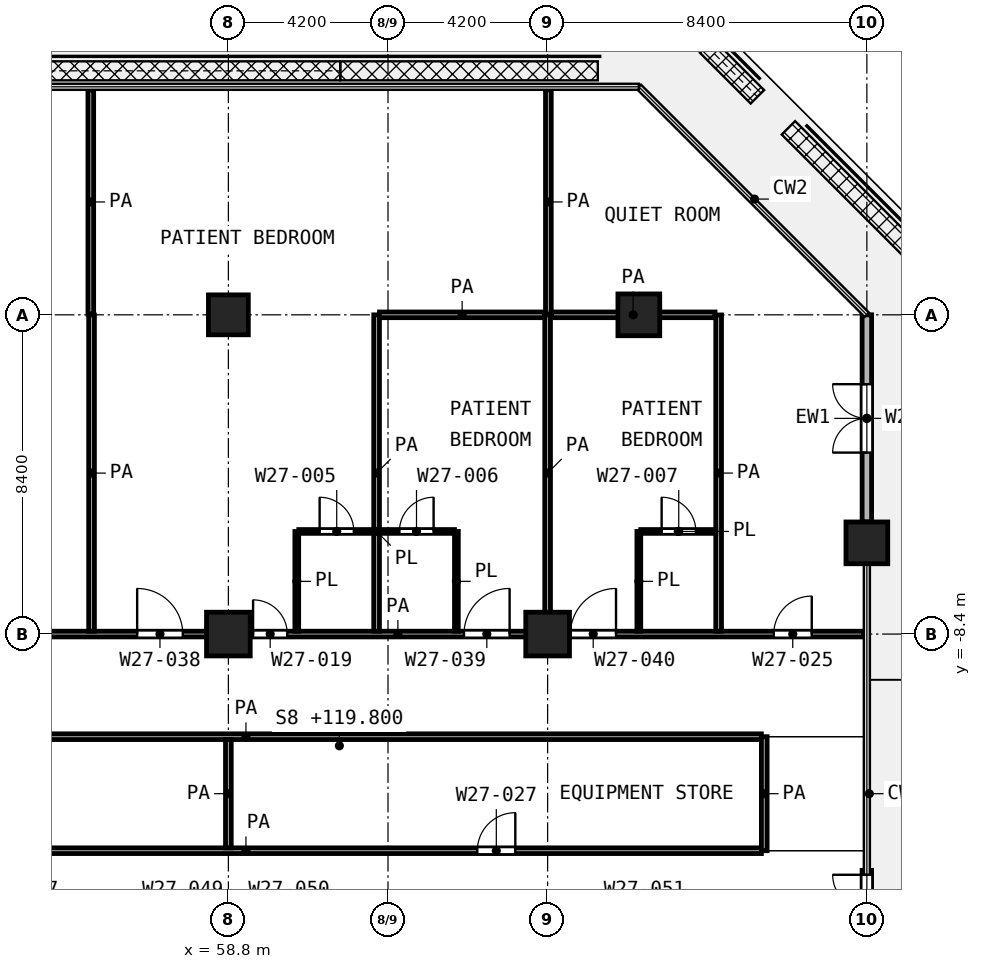
"""IFC4 building model, lengths in metres.
Left out: names, types, materials, properties, quantities, classifications, styles, units other than length and angle.
Written with IfcOpenShell. Run it as: python <this file> out.ifc"""

import sys

from ifc_helpers import new_model, si_unit, direction, frame, frame_2d, origin, origin_2d, place, context, subcontext, project, spatial, rectangle, extrude, element, fill, save


model = new_model("IFC4")
c1 = context("Model", 3, precision=1e-05, world=origin(), true_north=direction((0.0, 1.0)))
c2 = subcontext(c1, "Body", "Model", "MODEL_VIEW")
j1 = project(units=[si_unit("LENGTHUNIT", "METRE"), si_unit("PLANEANGLEUNIT", "RADIAN")], contexts=[c1])
p1 = place(None, origin())
s1 = spatial("IfcSite", under=j1, at=p1, CompositionType="ELEMENT")
p2 = place(p1, origin())
s2 = spatial("IfcBuilding", under=s1, at=p2, CompositionType="ELEMENT")
p3 = place(p2, frame((0.0, 0.0, 119.8)))
s3 = spatial("IfcBuildingStorey", under=s2, at=p3, CompositionType="ELEMENT", Elevation=119.8)
p4 = place(p3, frame((58.8, 0.0, 0.0), z_axis=(0.0, 0.0, 1.0), x_axis=(1.0, 0.0, 0.0)))
e1 = element("IfcColumn", 1, at=p4, inside=s3, PredefinedType="COLUMN", context=c2, shape_type="SweptSolid", body=[
    extrude(rectangle(XDim=1.05, YDim=1.05, at=origin_2d()), origin(), (0.0, 0.0, 1.0), 4.2),
])
for number, where, z_axis, x_axis in (
    (2, (69.6, 0.0, 0.0), (0.0, 0.0, 1.0), (1.0, 0.0, 0.0)),
    (3, (75.6, -6.0, 0.0), (0.0, 0.0, 1.0), (1.0, 0.0, 0.0)),
):
    element("IfcColumn", number, at=place(p3, frame(where, z_axis=z_axis, x_axis=x_axis)), inside=s3, PredefinedType="COLUMN", context=c2, shape_type="SweptSolid", body=[
        extrude(rectangle(XDim=1.1, YDim=1.1, at=origin_2d()), origin(), (0.0, 0.0, 1.0), 4.2),
    ])
for number, where, z_axis, x_axis in (
    (4, (58.8, -8.4, 0.0), (0.0, 0.0, 1.0), (1.0, 0.0, 0.0)),
    (5, (67.2, -8.4, 0.0), (0.0, 0.0, 1.0), (1.0, 0.0, 0.0)),
):
    element("IfcColumn", number, at=place(p3, frame(where, z_axis=z_axis, x_axis=x_axis)), inside=s3, PredefinedType="COLUMN", context=c2, shape_type="SweptSolid", body=[
        extrude(rectangle(XDim=1.15, YDim=1.15, at=origin_2d()), origin(), (0.0, 0.0, 1.0), 4.2),
    ])
p5 = place(p3, frame((75.6, -18.65, 0.0), z_axis=(0.0, 0.0, 1.0), x_axis=(0.0, 1.0, 0.0)))
e6 = element("IfcWall", 6, at=p5, inside=s3, PredefinedType="SOLIDWALL", context=c2, shape_type="SweptSolid", body=[
    extrude(rectangle(XDim=4.033, YDim=0.25, at=frame_2d((2.017, 0.0))), origin(), (0.0, 0.0, 1.0), 3.48),
])
p6 = place(p5, frame((2.117, 0.0, 0.0)))
e7 = element("IfcOpeningElement", 7, at=p6, cuts=e6, PredefinedType="OPENING", context=c2, shape_type="SweptSolid", body=[
    extrude(rectangle(XDim=1.8, YDim=2.1, at=frame_2d((0.9, 1.05))), frame((0.0, 0.135, 0.0), z_axis=(0.0, -1.0, 0.0), x_axis=(1.0, 0.0, 0.0)), (0.0, 0.0, 1.0), 0.27),
])
p7 = place(p3, frame((75.6, -5.45, 0.0), z_axis=(0.0, 0.0, 1.0), x_axis=(0.0, 1.0, 0.0)))
e8 = element("IfcWall", 8, at=p7, inside=s3, PredefinedType="SOLIDWALL", context=c2, shape_type="SweptSolid", body=[
    extrude(rectangle(XDim=5.45, YDim=0.25, at=frame_2d((2.725, 0.0))), origin(), (0.0, 0.0, 1.0), 3.48),
])
p8 = place(p7, frame((1.825, 0.0, 0.0)))
e9 = element("IfcOpeningElement", 9, at=p8, cuts=e8, PredefinedType="OPENING", context=c2, shape_type="SweptSolid", body=[
    extrude(rectangle(XDim=1.8, YDim=2.1, at=frame_2d((0.9, 1.05))), frame((0.0, 0.135, 0.0), z_axis=(0.0, -1.0, 0.0), x_axis=(1.0, 0.0, 0.0)), (0.0, 0.0, 1.0), 0.27),
])
p9 = place(p3, frame((60.652, -5.7, 0.0), z_axis=(0.0, 0.0, 1.0), x_axis=(1.0, 0.0, 0.0)))
e10 = element("IfcWall", 10, at=p9, inside=s3, PredefinedType="PARTITIONING", context=c2, shape_type="SweptSolid", body=[
    extrude(rectangle(XDim=4.098, YDim=0.1, at=frame_2d((2.049, 0.0))), origin(), (0.0, 0.0, 1.0), 3.6),
])
p10 = place(p9, frame((0.549, 0.0, 0.0)))
e11 = element("IfcOpeningElement", 11, at=p10, cuts=e10, PredefinedType="OPENING", context=c2, shape_type="SweptSolid", body=[
    extrude(rectangle(XDim=0.9, YDim=2.1, at=frame_2d((0.45, 1.05))), frame((0.0, 0.06, 0.0), z_axis=(0.0, -1.0, 0.0), x_axis=(1.0, 0.0, 0.0)), (0.0, 0.0, 1.0), 0.12),
])
p11 = place(p9, frame((2.648, 0.0, 0.0)))
e12 = element("IfcOpeningElement", 12, at=p11, cuts=e10, PredefinedType="OPENING", context=c2, shape_type="SweptSolid", body=[
    extrude(rectangle(XDim=0.9, YDim=2.1, at=frame_2d((0.45, 1.05))), frame((0.0, 0.06, 0.0), z_axis=(0.0, -1.0, 0.0), x_axis=(1.0, 0.0, 0.0)), (0.0, 0.0, 1.0), 0.12),
])
p12 = place(p3, frame((69.65, -5.7, 0.0), z_axis=(0.0, 0.0, 1.0), x_axis=(1.0, 0.0, 0.0)))
e13 = element("IfcWall", 13, at=p12, inside=s3, PredefinedType="PARTITIONING", context=c2, shape_type="SweptSolid", body=[
    extrude(rectangle(XDim=1.975, YDim=0.1, at=frame_2d((0.988, 0.0))), origin(), (0.0, 0.0, 1.0), 3.6),
])
p13 = place(p12, frame((0.55, 0.0, 0.0)))
e14 = element("IfcOpeningElement", 14, at=p13, cuts=e13, PredefinedType="OPENING", context=c2, shape_type="SweptSolid", body=[
    extrude(rectangle(XDim=0.9, YDim=2.1, at=frame_2d((0.45, 1.05))), frame((0.0, 0.06, 0.0), z_axis=(0.0, -1.0, 0.0), x_axis=(1.0, 0.0, 0.0)), (0.0, 0.0, 1.0), 0.12),
])
p14 = place(p3, frame((60.6, -8.325, 0.0), z_axis=(0.0, 0.0, 1.0), x_axis=(0.0, 1.0, 0.0)))
e15 = element("IfcWall", 15, at=p14, inside=s3, PredefinedType="PARTITIONING", context=c2, shape_type="SweptSolid", body=[
    extrude(rectangle(XDim=2.624, YDim=0.1, at=frame_2d((1.312, 0.0))), origin(), (0.0, 0.0, 1.0), 3.6),
])
for number, where, z_axis, x_axis in (
    (16, (64.8, -8.325, 0.0), (0.0, 0.0, 1.0), (0.0, 1.0, 0.0)),
    (17, (69.6, -8.325, 0.0), (0.0, 0.0, 1.0), (0.0, 1.0, 0.0)),
):
    element("IfcWall", number, at=place(p3, frame(where, z_axis=z_axis, x_axis=x_axis)), inside=s3, PredefinedType="PARTITIONING", context=c2, shape_type="SweptSolid", body=[
        extrude(rectangle(XDim=2.625, YDim=0.1, at=frame_2d((1.312, 0.0))), origin(), (0.0, 0.0, 1.0), 3.6),
    ])
p15 = place(p3, frame((45.7, -14.1, 0.0), z_axis=(0.0, 0.0, 1.0), x_axis=(1.0, 0.0, 0.0)))
e18 = element("IfcWall", 18, at=p15, inside=s3, PredefinedType="PARTITIONING", context=c2, shape_type="SweptSolid", body=[
    extrude(rectangle(XDim=27.125, YDim=0.15, at=frame_2d((13.562, 0.0))), origin(), (0.0, 0.0, 1.0), 3.6),
])
p16 = place(p15, frame((5.9, 0.0, 0.0)))
e19 = element("IfcOpeningElement", 19, at=p16, cuts=e18, PredefinedType="OPENING", context=c2, shape_type="SweptSolid", body=[
    extrude(rectangle(XDim=1.2, YDim=2.1, at=frame_2d((0.6, 1.05))), frame((0.0, 0.085, 0.0), z_axis=(0.0, -1.0, 0.0), x_axis=(1.0, 0.0, 0.0)), (0.0, 0.0, 1.0), 0.17),
])
p17 = place(p15, frame((19.65, 0.0, 0.0)))
e20 = element("IfcOpeningElement", 20, at=p17, cuts=e18, PredefinedType="OPENING", context=c2, shape_type="SweptSolid", body=[
    extrude(rectangle(XDim=1.0, YDim=2.1, at=frame_2d((0.5, 1.05))), frame((0.0, 0.085, 0.0), z_axis=(0.0, -1.0, 0.0), x_axis=(1.0, 0.0, 0.0)), (0.0, 0.0, 1.0), 0.17),
])
p18 = place(p3, frame((45.7, -11.1, 0.0), z_axis=(0.0, 0.0, 1.0), x_axis=(1.0, 0.0, 0.0)))
e21 = element("IfcWall", 21, at=p18, inside=s3, PredefinedType="PARTITIONING", context=c2, shape_type="SweptSolid", body=[
    extrude(rectangle(XDim=27.125, YDim=0.15, at=frame_2d((13.562, 0.0))), origin(), (0.0, 0.0, 1.0), 3.6),
])
p19 = place(p3, frame((51.0, -8.4, 0.0), z_axis=(0.0, 0.0, 1.0), x_axis=(1.0, 0.0, 0.0)))
e22 = element("IfcWall", 22, at=p19, inside=s3, PredefinedType="PARTITIONING", context=c2, shape_type="SweptSolid", body=[
    extrude(rectangle(XDim=24.52, YDim=0.15, at=frame_2d((12.26, 0.0))), origin(), (0.0, 0.0, 1.0), 3.6),
])
p20 = place(p19, frame((5.4, 0.0, 0.0)))
e23 = element("IfcOpeningElement", 23, at=p20, cuts=e22, PredefinedType="OPENING", context=c2, shape_type="SweptSolid", body=[
    extrude(rectangle(XDim=1.2, YDim=2.1, at=frame_2d((0.6, 1.05))), frame((0.0, 0.085, 0.0), z_axis=(0.0, -1.0, 0.0), x_axis=(1.0, 0.0, 0.0)), (0.0, 0.0, 1.0), 0.17),
])
p21 = place(p19, frame((8.45, 0.0, 0.0)))
e24 = element("IfcOpeningElement", 24, at=p21, cuts=e22, PredefinedType="OPENING", context=c2, shape_type="SweptSolid", body=[
    extrude(rectangle(XDim=0.9, YDim=2.1, at=frame_2d((0.45, 1.05))), frame((0.0, 0.085, 0.0), z_axis=(0.0, -1.0, 0.0), x_axis=(1.0, 0.0, 0.0)), (0.0, 0.0, 1.0), 0.17),
])
p22 = place(p19, frame((14.0, 0.0, 0.0)))
e25 = element("IfcOpeningElement", 25, at=p22, cuts=e22, PredefinedType="OPENING", context=c2, shape_type="SweptSolid", body=[
    extrude(rectangle(XDim=1.2, YDim=2.1, at=frame_2d((0.6, 1.05))), frame((0.0, 0.085, 0.0), z_axis=(0.0, -1.0, 0.0), x_axis=(1.0, 0.0, 0.0)), (0.0, 0.0, 1.0), 0.17),
])
p23 = place(p19, frame((16.8, 0.0, 0.0)))
e26 = element("IfcOpeningElement", 26, at=p23, cuts=e22, PredefinedType="OPENING", context=c2, shape_type="SweptSolid", body=[
    extrude(rectangle(XDim=1.2, YDim=2.1, at=frame_2d((0.6, 1.05))), frame((0.0, 0.085, 0.0), z_axis=(0.0, -1.0, 0.0), x_axis=(1.0, 0.0, 0.0)), (0.0, 0.0, 1.0), 0.17),
])
p24 = place(p19, frame((22.15, 0.0, 0.0)))
e27 = element("IfcOpeningElement", 27, at=p24, cuts=e22, PredefinedType="OPENING", context=c2, shape_type="SweptSolid", body=[
    extrude(rectangle(XDim=1.0, YDim=2.1, at=frame_2d((0.5, 1.05))), frame((0.0, 0.085, 0.0), z_axis=(0.0, -1.0, 0.0), x_axis=(1.0, 0.0, 0.0)), (0.0, 0.0, 1.0), 0.17),
])
p25 = place(p3, frame((62.777, 0.0, 0.0), z_axis=(0.0, 0.0, 1.0), x_axis=(1.0, 0.0, 0.0)))
e28 = element("IfcWall", 28, at=p25, inside=s3, PredefinedType="PARTITIONING", context=c2, shape_type="SweptSolid", body=[
    extrude(rectangle(XDim=4.348, YDim=0.15, at=frame_2d((2.174, 0.0))), origin(), (0.0, 0.0, 1.0), 3.6),
])
p26 = place(p3, frame((67.295, 0.0, 0.0), z_axis=(0.0, 0.0, 1.0), x_axis=(1.0, 0.0, 0.0)))
e29 = element("IfcWall", 29, at=p26, inside=s3, PredefinedType="PARTITIONING", context=c2, shape_type="SweptSolid", body=[
    extrude(rectangle(XDim=4.31, YDim=0.15, at=frame_2d((2.155, 0.0))), origin(), (0.0, 0.0, 1.0), 3.6),
])
p27 = place(p3, frame((55.18, 0.02, 0.0), z_axis=(0.0, 0.0, 1.0), x_axis=(0.0, 1.0, 0.0)))
e30 = element("IfcWall", 30, at=p27, inside=s3, PredefinedType="PARTITIONING", context=c2, shape_type="SweptSolid", body=[
    extrude(rectangle(XDim=5.9, YDim=0.15, at=frame_2d((2.95, 0.0))), origin(), (0.0, 0.0, 1.0), 3.6),
])
p28 = place(p3, frame((55.2, -8.325, 0.0), z_axis=(0.0, 0.0, 1.0), x_axis=(0.0, 1.0, 0.0)))
e31 = element("IfcWall", 31, at=p28, inside=s3, PredefinedType="PARTITIONING", context=c2, shape_type="SweptSolid", body=[
    extrude(rectangle(XDim=8.321, YDim=0.15, at=frame_2d((4.161, 0.0))), origin(), (0.0, 0.0, 1.0), 3.6),
])
p29 = place(p3, frame((58.8, -14.025, 0.0), z_axis=(0.0, 0.0, 1.0), x_axis=(0.0, 1.0, 0.0)))
e32 = element("IfcWall", 32, at=p29, inside=s3, PredefinedType="PARTITIONING", context=c2, shape_type="SweptSolid", body=[
    extrude(rectangle(XDim=2.85, YDim=0.15, at=frame_2d((1.425, 0.0))), origin(), (0.0, 0.0, 1.0), 3.6),
])
p30 = place(p3, frame((62.7, -8.325, 0.0), z_axis=(0.0, 0.0, 1.0), x_axis=(0.0, 1.0, 0.0)))
e33 = element("IfcWall", 33, at=p30, inside=s3, PredefinedType="PARTITIONING", context=c2, shape_type="SweptSolid", body=[
    extrude(rectangle(XDim=8.324, YDim=0.15, at=frame_2d((4.162, 0.0))), origin(), (0.0, 0.0, 1.0), 3.6),
])
p31 = place(p3, frame((67.2, -8.325, 0.0), z_axis=(0.0, 0.0, 1.0), x_axis=(0.0, 1.0, 0.0)))
e34 = element("IfcWall", 34, at=p31, inside=s3, PredefinedType="PARTITIONING", context=c2, shape_type="SweptSolid", body=[
    extrude(rectangle(XDim=8.325, YDim=0.15, at=frame_2d((4.163, 0.0))), origin(), (0.0, 0.0, 1.0), 3.6),
])
p32 = place(p3, frame((67.22, 0.02, 0.0), z_axis=(0.0, 0.0, 1.0), x_axis=(0.0, 1.0, 0.0)))
e35 = element("IfcWall", 35, at=p32, inside=s3, PredefinedType="PARTITIONING", context=c2, shape_type="SweptSolid", body=[
    extrude(rectangle(XDim=5.9, YDim=0.15, at=frame_2d((2.95, 0.0))), origin(), (0.0, 0.0, 1.0), 3.6),
])
p33 = place(p3, frame((71.7, -8.325, 0.0), z_axis=(0.0, 0.0, 1.0), x_axis=(0.0, 1.0, 0.0)))
e36 = element("IfcWall", 36, at=p33, inside=s3, PredefinedType="PARTITIONING", context=c2, shape_type="SweptSolid", body=[
    extrude(rectangle(XDim=8.322, YDim=0.15, at=frame_2d((4.161, 0.0))), origin(), (0.0, 0.0, 1.0), 3.6),
])
p34 = place(p3, frame((72.9, -14.1, 0.0), z_axis=(0.0, 0.0, 1.0), x_axis=(0.0, 1.0, 0.0)))
e37 = element("IfcWall", 37, at=p34, inside=s3, PredefinedType="PARTITIONING", context=c2, shape_type="SweptSolid", body=[
    extrude(rectangle(XDim=3.0, YDim=0.15, at=frame_2d((1.5, 0.0))), origin(), (0.0, 0.0, 1.0), 3.6),
])
p35 = place(p6, origin())
e38 = element("IfcDoor", 38, at=p35, inside=s3, OperationType="DOUBLE_DOOR_SINGLE_SWING", PredefinedType="DOOR", context=c2, shape_type="SweptSolid", body=[
    extrude(rectangle(XDim=1.8, YDim=2.1, at=frame_2d((0.9, 1.05))), frame((0.0, 0.025, 0.0), z_axis=(0.0, -1.0, 0.0), x_axis=(1.0, 0.0, 0.0)), (0.0, 0.0, 1.0), 0.05),
])
fill(e7, e38)
p36 = place(p8, origin())
e39 = element("IfcDoor", 39, at=p36, inside=s3, OperationType="DOUBLE_DOOR_SINGLE_SWING", PredefinedType="DOOR", context=c2, shape_type="SweptSolid", body=[
    extrude(rectangle(XDim=1.8, YDim=2.1, at=frame_2d((0.9, 1.05))), frame((0.0, 0.025, 0.0), z_axis=(0.0, -1.0, 0.0), x_axis=(1.0, 0.0, 0.0)), (0.0, 0.0, 1.0), 0.05),
])
fill(e9, e39)
p37 = place(p20, origin())
e40 = element("IfcDoor", 40, at=p37, inside=s3, OperationType="SINGLE_SWING_LEFT", PredefinedType="DOOR", context=c2, shape_type="SweptSolid", body=[
    extrude(rectangle(XDim=1.2, YDim=2.1, at=frame_2d((0.6, 1.05))), frame((0.0, 0.025, 0.0), z_axis=(0.0, -1.0, 0.0), x_axis=(1.0, 0.0, 0.0)), (0.0, 0.0, 1.0), 0.05),
])
fill(e23, e40)
p38 = place(p21, origin())
e41 = element("IfcDoor", 41, at=p38, inside=s3, OperationType="SINGLE_SWING_LEFT", PredefinedType="DOOR", context=c2, shape_type="SweptSolid", body=[
    extrude(rectangle(XDim=0.9, YDim=2.1, at=frame_2d((0.45, 1.05))), frame((0.0, 0.025, 0.0), z_axis=(0.0, -1.0, 0.0), x_axis=(1.0, 0.0, 0.0)), (0.0, 0.0, 1.0), 0.05),
])
fill(e24, e41)
p39 = place(p10, origin())
e42 = element("IfcDoor", 42, at=p39, inside=s3, OperationType="SINGLE_SWING_LEFT", PredefinedType="DOOR", context=c2, shape_type="SweptSolid", body=[
    extrude(rectangle(XDim=0.9, YDim=2.1, at=frame_2d((0.45, 1.05))), frame((0.0, 0.025, 0.0), z_axis=(0.0, -1.0, 0.0), x_axis=(1.0, 0.0, 0.0)), (0.0, 0.0, 1.0), 0.05),
])
fill(e11, e42)
p40 = place(p22, origin())
e43 = element("IfcDoor", 43, at=p40, inside=s3, OperationType="SINGLE_SWING_RIGHT", PredefinedType="DOOR", context=c2, shape_type="SweptSolid", body=[
    extrude(rectangle(XDim=1.2, YDim=2.1, at=frame_2d((0.6, 1.05))), frame((0.0, 0.025, 0.0), z_axis=(0.0, -1.0, 0.0), x_axis=(1.0, 0.0, 0.0)), (0.0, 0.0, 1.0), 0.05),
])
fill(e25, e43)
p41 = place(p11, origin())
e44 = element("IfcDoor", 44, at=p41, inside=s3, OperationType="SINGLE_SWING_RIGHT", PredefinedType="DOOR", context=c2, shape_type="SweptSolid", body=[
    extrude(rectangle(XDim=0.9, YDim=2.1, at=frame_2d((0.45, 1.05))), frame((0.0, 0.025, 0.0), z_axis=(0.0, -1.0, 0.0), x_axis=(1.0, 0.0, 0.0)), (0.0, 0.0, 1.0), 0.05),
])
fill(e12, e44)
p42 = place(p23, origin())
e45 = element("IfcDoor", 45, at=p42, inside=s3, OperationType="SINGLE_SWING_RIGHT", PredefinedType="DOOR", context=c2, shape_type="SweptSolid", body=[
    extrude(rectangle(XDim=1.2, YDim=2.1, at=frame_2d((0.6, 1.05))), frame((0.0, 0.025, 0.0), z_axis=(0.0, -1.0, 0.0), x_axis=(1.0, 0.0, 0.0)), (0.0, 0.0, 1.0), 0.05),
])
fill(e26, e45)
p43 = place(p13, origin())
e46 = element("IfcDoor", 46, at=p43, inside=s3, OperationType="SINGLE_SWING_LEFT", PredefinedType="DOOR", context=c2, shape_type="SweptSolid", body=[
    extrude(rectangle(XDim=0.9, YDim=2.1, at=frame_2d((0.45, 1.05))), frame((0.0, 0.025, 0.0), z_axis=(0.0, -1.0, 0.0), x_axis=(1.0, 0.0, 0.0)), (0.0, 0.0, 1.0), 0.05),
])
fill(e14, e46)
p44 = place(p24, origin())
e47 = element("IfcDoor", 47, at=p44, inside=s3, OperationType="SINGLE_SWING_RIGHT", PredefinedType="DOOR", context=c2, shape_type="SweptSolid", body=[
    extrude(rectangle(XDim=1.0, YDim=2.1, at=frame_2d((0.5, 1.05))), frame((0.0, 0.025, 0.0), z_axis=(0.0, -1.0, 0.0), x_axis=(1.0, 0.0, 0.0)), (0.0, 0.0, 1.0), 0.05),
])
fill(e27, e47)
p45 = place(p17, origin())
e48 = element("IfcDoor", 48, at=p45, inside=s3, OperationType="SINGLE_SWING_RIGHT", PredefinedType="DOOR", context=c2, shape_type="SweptSolid", body=[
    extrude(rectangle(XDim=1.0, YDim=2.1, at=frame_2d((0.5, 1.05))), frame((0.0, 0.025, 0.0), z_axis=(0.0, -1.0, 0.0), x_axis=(1.0, 0.0, 0.0)), (0.0, 0.0, 1.0), 0.05),
])
fill(e20, e48)
save(model, sys.argv[1])
